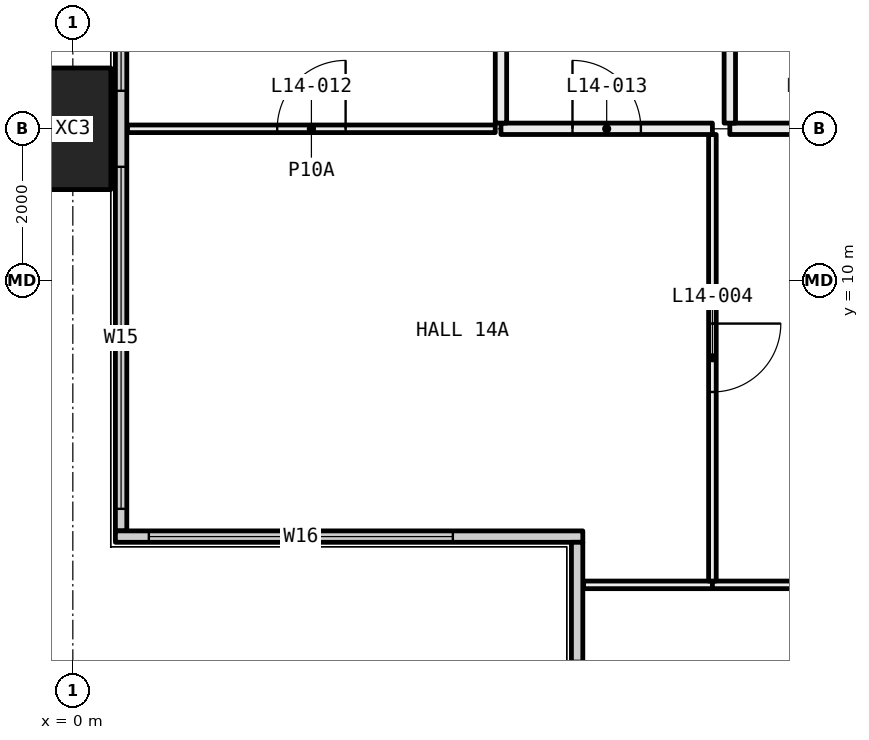
"""IFC4 building model, lengths in metres.
Left out: names, types, materials, properties, quantities, classifications, styles, units other than length and angle.
Written with IfcOpenShell. Run it as: python <this file> out.ifc"""

import sys

from ifc_helpers import new_model, si_unit, direction, frame, frame_2d, origin, origin_2d, place, context, subcontext, project, spatial, rectangle, hollow_rectangle, extrude, element, fill, save


model = new_model("IFC4")
c1 = context("Model", 3, precision=1e-05, world=origin(), true_north=direction((0.0, 1.0)))
c2 = subcontext(c1, "Body", "Model", "MODEL_VIEW")
j1 = project(units=[si_unit("LENGTHUNIT", "METRE"), si_unit("PLANEANGLEUNIT", "RADIAN")], contexts=[c1])
p1 = place(None, origin())
s1 = spatial("IfcSite", under=j1, at=p1, CompositionType="ELEMENT")
p2 = place(p1, origin())
s2 = spatial("IfcBuilding", under=s1, at=p2, CompositionType="ELEMENT")
p3 = place(p2, frame((0.0, 0.0, 61.05)))
s3 = spatial("IfcBuildingStorey", under=s2, at=p3, CompositionType="ELEMENT", Elevation=61.05)
p4 = place(p3, frame((0.0, 12.0, -0.4), z_axis=(0.0, 0.0, 1.0), x_axis=(0.0, 1.0, 0.0)))
e1 = element("IfcColumn", 1, at=p4, inside=s3, PredefinedType="COLUMN", context=c2, shape_type="SweptSolid", body=[
    extrude(hollow_rectangle(XDim=1.6, YDim=1.0, WallThickness=0.065, at=origin_2d()), origin(), (0.0, 0.0, 1.0), 3.45),
])
p5 = place(p3, frame((0.635, 6.71, 0.0), z_axis=(0.0, 0.0, 1.0), x_axis=(0.0, 1.0, 0.0)))
e2 = element("IfcWall", 2, at=p5, inside=s3, PredefinedType="ELEMENTEDWALL", context=c2, shape_type="SweptSolid", body=[
    extrude(rectangle(XDim=34.58, YDim=0.15, at=frame_2d((17.29, 0.0))), origin(), (0.0, 0.0, 1.0), 3.05),
])
p6 = place(p5, frame((0.29, 0.0, 0.45)))
e3 = element("IfcOpeningElement", 3, at=p6, cuts=e2, PredefinedType="OPENING", context=c2, shape_type="SweptSolid", body=[
    extrude(rectangle(XDim=4.5, YDim=2.55, at=frame_2d((2.25, 1.275))), frame((0.0, 0.085, 0.0), z_axis=(0.0, -1.0, 0.0), x_axis=(1.0, 0.0, 0.0)), (0.0, 0.0, 1.0), 0.17),
])
p7 = place(p5, frame((5.79, 0.0, 0.45)))
e4 = element("IfcOpeningElement", 4, at=p7, cuts=e2, PredefinedType="OPENING", context=c2, shape_type="SweptSolid", body=[
    extrude(rectangle(XDim=3.0, YDim=2.55, at=frame_2d((1.5, 1.275))), frame((0.0, 0.085, 0.0), z_axis=(0.0, -1.0, 0.0), x_axis=(1.0, 0.0, 0.0)), (0.0, 0.0, 1.0), 0.17),
])
p8 = place(p5, frame((13.79, 0.0, 0.45)))
e5 = element("IfcOpeningElement", 5, at=p8, cuts=e2, PredefinedType="OPENING", context=c2, shape_type="SweptSolid", body=[
    extrude(rectangle(XDim=3.0, YDim=2.55, at=frame_2d((1.5, 1.275))), frame((0.0, 0.085, 0.0), z_axis=(0.0, -1.0, 0.0), x_axis=(1.0, 0.0, 0.0)), (0.0, 0.0, 1.0), 0.17),
])
p9 = place(p5, frame((17.79, 0.0, 0.45)))
e6 = element("IfcOpeningElement", 6, at=p9, cuts=e2, PredefinedType="OPENING", context=c2, shape_type="SweptSolid", body=[
    extrude(rectangle(XDim=3.0, YDim=2.55, at=frame_2d((1.5, 1.275))), frame((0.0, 0.085, 0.0), z_axis=(0.0, -1.0, 0.0), x_axis=(1.0, 0.0, 0.0)), (0.0, 0.0, 1.0), 0.17),
])
p10 = place(p5, frame((26.79, 0.0, 0.45)))
e7 = element("IfcOpeningElement", 7, at=p10, cuts=e2, PredefinedType="OPENING", context=c2, shape_type="SweptSolid", body=[
    extrude(rectangle(XDim=2.0, YDim=2.55, at=frame_2d((1.0, 1.275))), frame((0.0, 0.085, 0.0), z_axis=(0.0, -1.0, 0.0), x_axis=(1.0, 0.0, 0.0)), (0.0, 0.0, 1.0), 0.17),
])
p11 = place(p5, frame((29.79, 0.0, 0.45)))
e8 = element("IfcOpeningElement", 8, at=p11, cuts=e2, PredefinedType="OPENING", context=c2, shape_type="SweptSolid", body=[
    extrude(rectangle(XDim=4.5, YDim=2.55, at=frame_2d((2.25, 1.275))), frame((0.0, 0.085, 0.0), z_axis=(0.0, -1.0, 0.0), x_axis=(1.0, 0.0, 0.0)), (0.0, 0.0, 1.0), 0.17),
])
p12 = place(p3, frame((0.56, 6.635, 0.0), z_axis=(0.0, 0.0, 1.0), x_axis=(1.0, 0.0, 0.0)))
e9 = element("IfcWall", 9, at=p12, inside=s3, PredefinedType="ELEMENTEDWALL", context=c2, shape_type="SweptSolid", body=[
    extrude(rectangle(XDim=6.15, YDim=0.15, at=frame_2d((3.075, 0.0))), origin(), (0.0, 0.0, 1.0), 3.05),
])
p13 = place(p12, frame((0.44, 0.0, 0.45)))
e10 = element("IfcOpeningElement", 10, at=p13, cuts=e9, PredefinedType="OPENING", context=c2, shape_type="SweptSolid", body=[
    extrude(rectangle(XDim=4.0, YDim=2.55, at=frame_2d((2.0, 1.275))), frame((0.0, 0.085, 0.0), z_axis=(0.0, -1.0, 0.0), x_axis=(1.0, 0.0, 0.0)), (0.0, 0.0, 1.0), 0.17),
])
p14 = place(p3, frame((6.635, 0.71, 0.0), z_axis=(0.0, 0.0, 1.0), x_axis=(0.0, 1.0, 0.0)))
e11 = element("IfcWall", 11, at=p14, inside=s3, PredefinedType="ELEMENTEDWALL", context=c2, shape_type="SweptSolid", body=[
    extrude(rectangle(XDim=5.85, YDim=0.15, at=frame_2d((2.925, 0.0))), origin(), (0.0, 0.0, 1.0), 3.05),
])
p15 = place(p14, frame((0.29, 0.0, 0.45)))
e12 = element("IfcOpeningElement", 12, at=p15, cuts=e11, PredefinedType="OPENING", context=c2, shape_type="SweptSolid", body=[
    extrude(rectangle(XDim=4.0, YDim=2.55, at=frame_2d((2.0, 1.275))), frame((0.0, 0.085, 0.0), z_axis=(0.0, -1.0, 0.0), x_axis=(1.0, 0.0, 0.0)), (0.0, 0.0, 1.0), 0.17),
])
p16 = place(p3, frame((8.415, 6.0, 0.0), z_axis=(0.0, 0.0, 1.0), x_axis=(-1.0, 0.0, 0.0)))
e13 = element("IfcWall", 13, at=p16, inside=s3, PredefinedType="PARTITIONING", context=c2, shape_type="SweptSolid", body=[
    extrude(rectangle(XDim=1.695, YDim=0.1, at=frame_2d((0.848, 0.0))), origin(), (0.0, 0.0, 1.0), 3.05),
])
p17 = place(p3, frame((11.95, 6.0, 0.0), z_axis=(0.0, 0.0, 1.0), x_axis=(-1.0, 0.0, 0.0)))
e14 = element("IfcWall", 14, at=p17, inside=s3, PredefinedType="PARTITIONING", context=c2, shape_type="SweptSolid", body=[
    extrude(rectangle(XDim=3.535, YDim=0.1, at=frame_2d((1.768, 0.0))), origin(), (0.0, 0.0, 1.0), 2.45),
])
p18 = place(p17, frame((1.317, 0.0, 0.0)))
e15 = element("IfcOpeningElement", 15, at=p18, cuts=e14, PredefinedType="OPENING", context=c2, shape_type="SweptSolid", body=[
    extrude(rectangle(XDim=0.9, YDim=2.1, at=frame_2d((0.45, 1.05))), frame((0.0, 0.06, 0.0), z_axis=(0.0, -1.0, 0.0), x_axis=(1.0, 0.0, 0.0)), (0.0, 0.0, 1.0), 0.12),
])
p19 = place(p3, frame((8.415, 6.05, 0.0), z_axis=(0.0, 0.0, 1.0), x_axis=(0.0, 1.0, 0.0)))
e16 = element("IfcWall", 16, at=p19, inside=s3, PredefinedType="PARTITIONING", context=c2, shape_type="SweptSolid", body=[
    extrude(rectangle(XDim=5.875, YDim=0.1, at=frame_2d((2.938, 0.0))), origin(), (0.0, 0.0, 1.0), 2.45),
])
p20 = place(p19, frame((2.488, 0.0, 0.0)))
e17 = element("IfcOpeningElement", 17, at=p20, cuts=e16, PredefinedType="OPENING", context=c2, shape_type="SweptSolid", body=[
    extrude(rectangle(XDim=0.9, YDim=2.1, at=frame_2d((0.45, 1.05))), frame((0.0, 0.06, 0.0), z_axis=(0.0, -1.0, 0.0), x_axis=(1.0, 0.0, 0.0)), (0.0, 0.0, 1.0), 0.12),
])
p21 = place(p3, frame((5.558, 12.0, 0.0), z_axis=(0.0, 0.0, 1.0), x_axis=(-1.0, 0.0, 0.0)))
e18 = element("IfcWall", 18, at=p21, inside=s3, PredefinedType="PARTITIONING", context=c2, shape_type="SweptSolid", body=[
    extrude(rectangle(XDim=4.838, YDim=0.1, at=frame_2d((2.419, 0.0))), origin(), (0.0, 0.0, 1.0), 2.45),
])
p22 = place(p21, frame((1.969, 0.0, 0.0)))
e19 = element("IfcOpeningElement", 19, at=p22, cuts=e18, PredefinedType="OPENING", context=c2, shape_type="SweptSolid", body=[
    extrude(rectangle(XDim=0.9, YDim=2.1, at=frame_2d((0.45, 1.05))), frame((0.0, 0.06, 0.0), z_axis=(0.0, -1.0, 0.0), x_axis=(1.0, 0.0, 0.0)), (0.0, 0.0, 1.0), 0.12),
])
p23 = place(p3, frame((8.415, 12.0, 0.0), z_axis=(0.0, 0.0, 1.0), x_axis=(-1.0, 0.0, 0.0)))
e20 = element("IfcWall", 20, at=p23, inside=s3, PredefinedType="PARTITIONING", context=c2, shape_type="SweptSolid", body=[
    extrude(rectangle(XDim=2.782, YDim=0.15, at=frame_2d((1.391, 0.0))), origin(), (0.0, 0.0, 1.0), 2.45),
])
p24 = place(p23, frame((0.941, 0.0, 0.0)))
e21 = element("IfcOpeningElement", 21, at=p24, cuts=e20, PredefinedType="OPENING", context=c2, shape_type="SweptSolid", body=[
    extrude(rectangle(XDim=0.9, YDim=2.1, at=frame_2d((0.45, 1.05))), frame((0.0, 0.085, 0.0), z_axis=(0.0, -1.0, 0.0), x_axis=(1.0, 0.0, 0.0)), (0.0, 0.0, 1.0), 0.17),
])
p25 = place(p3, frame((11.2, 12.0, 0.0), z_axis=(0.0, 0.0, 1.0), x_axis=(-1.0, 0.0, 0.0)))
e22 = element("IfcWall", 22, at=p25, inside=s3, PredefinedType="PARTITIONING", context=c2, shape_type="SweptSolid", body=[
    extrude(rectangle(XDim=2.556, YDim=0.15, at=frame_2d((1.278, 0.0))), origin(), (0.0, 0.0, 1.0), 2.45),
])
p26 = place(p25, frame((0.828, 0.0, 0.0)))
e23 = element("IfcOpeningElement", 23, at=p26, cuts=e22, PredefinedType="OPENING", context=c2, shape_type="SweptSolid", body=[
    extrude(rectangle(XDim=0.9, YDim=2.1, at=frame_2d((0.45, 1.05))), frame((0.0, 0.085, 0.0), z_axis=(0.0, -1.0, 0.0), x_axis=(1.0, 0.0, 0.0)), (0.0, 0.0, 1.0), 0.17),
])
p27 = place(p3, frame((5.633, 12.075, 0.0), z_axis=(0.0, 0.0, 1.0), x_axis=(0.0, 1.0, 0.0)))
e24 = element("IfcWall", 24, at=p27, inside=s3, PredefinedType="PARTITIONING", context=c2, shape_type="SweptSolid", body=[
    extrude(rectangle(XDim=3.91, YDim=0.15, at=frame_2d((1.955, 0.0))), origin(), (0.0, 0.0, 1.0), 2.45),
])
p28 = place(p3, frame((8.644, 12.075, 0.0), z_axis=(0.0, 0.0, 1.0), x_axis=(0.0, 1.0, 0.0)))
e25 = element("IfcWall", 25, at=p28, inside=s3, PredefinedType="PARTITIONING", context=c2, shape_type="SweptSolid", body=[
    extrude(rectangle(XDim=2.396, YDim=0.15, at=frame_2d((1.198, 0.0))), origin(), (0.0, 0.0, 1.0), 2.45),
])
p29 = place(p6, origin())
e26 = element("IfcWindow", 26, at=p29, inside=s3, PartitioningType="SINGLE_PANEL", PredefinedType="WINDOW", context=c2, shape_type="SweptSolid", body=[
    extrude(rectangle(XDim=4.5, YDim=2.55, at=frame_2d((2.25, 1.275))), frame((0.0, 0.03, 0.0), z_axis=(0.0, -1.0, 0.0), x_axis=(1.0, 0.0, 0.0)), (0.0, 0.0, 1.0), 0.06),
])
fill(e3, e26)
p30 = place(p7, origin())
e27 = element("IfcWindow", 27, at=p30, inside=s3, PartitioningType="SINGLE_PANEL", PredefinedType="WINDOW", context=c2, shape_type="SweptSolid", body=[
    extrude(rectangle(XDim=3.0, YDim=2.55, at=frame_2d((1.5, 1.275))), frame((0.0, 0.03, 0.0), z_axis=(0.0, -1.0, 0.0), x_axis=(1.0, 0.0, 0.0)), (0.0, 0.0, 1.0), 0.06),
])
fill(e4, e27)
p31 = place(p13, origin())
e28 = element("IfcWindow", 28, at=p31, inside=s3, PartitioningType="SINGLE_PANEL", PredefinedType="WINDOW", context=c2, shape_type="SweptSolid", body=[
    extrude(rectangle(XDim=4.0, YDim=2.55, at=frame_2d((2.0, 1.275))), frame((0.0, 0.03, 0.0), z_axis=(0.0, -1.0, 0.0), x_axis=(1.0, 0.0, 0.0)), (0.0, 0.0, 1.0), 0.06),
])
fill(e10, e28)
p32 = place(p20, frame((0.9, 0.0, 0.0), x_axis=(-1.0, 0.0, 0.0)))
e29 = element("IfcDoor", 29, at=p32, inside=s3, OperationType="SINGLE_SWING_RIGHT", PredefinedType="DOOR", context=c2, shape_type="SweptSolid", body=[
    extrude(rectangle(XDim=0.9, YDim=2.1, at=frame_2d((0.45, 1.05))), frame((0.0, 0.025, 0.0), z_axis=(0.0, -1.0, 0.0), x_axis=(1.0, 0.0, 0.0)), (0.0, 0.0, 1.0), 0.05),
])
fill(e17, e29)
p33 = place(p22, frame((0.9, 0.0, 0.0), x_axis=(-1.0, 0.0, 0.0)))
e30 = element("IfcDoor", 30, at=p33, inside=s3, OperationType="SINGLE_SWING_LEFT", PredefinedType="DOOR", context=c2, shape_type="SweptSolid", body=[
    extrude(rectangle(XDim=0.9, YDim=2.1, at=frame_2d((0.45, 1.05))), frame((0.0, 0.025, 0.0), z_axis=(0.0, -1.0, 0.0), x_axis=(1.0, 0.0, 0.0)), (0.0, 0.0, 1.0), 0.05),
])
fill(e19, e30)
p34 = place(p24, frame((0.9, 0.0, 0.0), x_axis=(-1.0, 0.0, 0.0)))
e31 = element("IfcDoor", 31, at=p34, inside=s3, OperationType="SINGLE_SWING_RIGHT", PredefinedType="DOOR", context=c2, shape_type="SweptSolid", body=[
    extrude(rectangle(XDim=0.9, YDim=2.1, at=frame_2d((0.45, 1.05))), frame((0.0, 0.025, 0.0), z_axis=(0.0, -1.0, 0.0), x_axis=(1.0, 0.0, 0.0)), (0.0, 0.0, 1.0), 0.05),
])
fill(e21, e31)
save(model, sys.argv[1])
